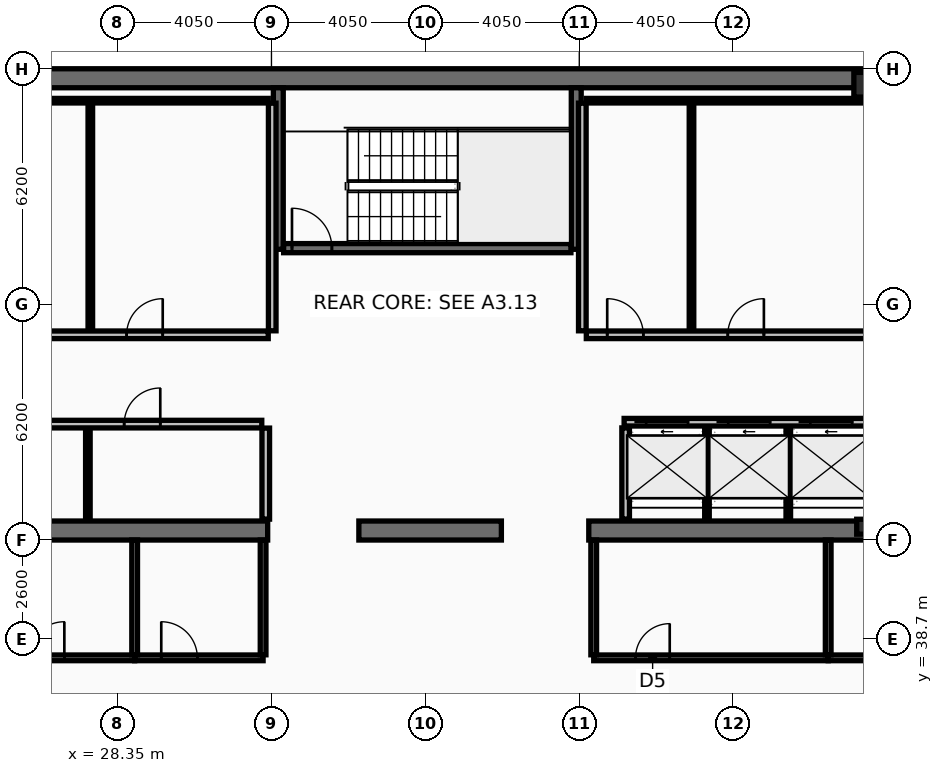
"""IFC4 building model, lengths in metres.
Left out: names, types, materials, properties, quantities, classifications, styles, units other than length and angle.
Written with IfcOpenShell. Run it as: python <this file> out.ifc"""

import sys

from ifc_helpers import new_model, si_unit, direction, frame, frame_2d, origin, origin_2d, place, context, subcontext, project, spatial, rectangle, hollow_rectangle, i_section, extrude, element, fill, save


model = new_model("IFC4")
c1 = context("Model", 3, precision=1e-05, world=origin(), true_north=direction((0.0, 1.0)))
c2 = subcontext(c1, "Body", "Model", "MODEL_VIEW")
j1 = project(units=[si_unit("LENGTHUNIT", "METRE"), si_unit("PLANEANGLEUNIT", "RADIAN")], contexts=[c1])
p1 = place(None, origin())
s1 = spatial("IfcSite", under=j1, at=p1, CompositionType="ELEMENT")
p2 = place(p1, origin())
s2 = spatial("IfcBuilding", under=s1, at=p2, CompositionType="ELEMENT")
p3 = place(p2, frame((0.0, 0.0, 325.4)))
s3 = spatial("IfcBuildingStorey", under=s2, at=p3, CompositionType="ELEMENT", Elevation=325.4)
p4 = place(p3, frame((16.2, 53.45, 0.0), z_axis=(0.0, 0.0, 1.0), x_axis=(1.0, 0.0, 0.0)))
e1 = element("IfcWall", 1, at=p4, inside=s3, PredefinedType="SHEAR", context=c2, shape_type="SweptSolid", body=[
    extrude(rectangle(XDim=40.5, YDim=0.5, at=frame_2d((20.25, 0.0))), origin(), (0.0, 0.0, 1.0), 3.44),
])
p5 = place(p3, frame((32.3, 41.55, 0.0), z_axis=(0.0, 0.0, 1.0), x_axis=(-1.0, 0.0, 0.0)))
e2 = element("IfcWall", 2, at=p5, inside=s3, PredefinedType="SHEAR", context=c2, shape_type="SweptSolid", body=[
    extrude(rectangle(XDim=11.45, YDim=0.5, at=frame_2d((5.725, 0.0))), origin(), (0.0, 0.0, 1.0), 3.44),
])
p6 = place(p3, frame((38.45, 41.55, 0.0), z_axis=(0.0, 0.0, 1.0), x_axis=(-1.0, 0.0, 0.0)))
e3 = element("IfcWall", 3, at=p6, inside=s3, PredefinedType="SHEAR", context=c2, shape_type="SweptSolid", body=[
    extrude(rectangle(XDim=3.75, YDim=0.5, at=frame_2d((1.875, 0.0))), origin(), (0.0, 0.0, 1.0), 3.44),
])
p7 = place(p3, frame((52.05, 41.55, 0.0), z_axis=(0.0, 0.0, 1.0), x_axis=(-1.0, 0.0, 0.0)))
e4 = element("IfcWall", 4, at=p7, inside=s3, PredefinedType="SHEAR", context=c2, shape_type="SweptSolid", body=[
    extrude(rectangle(XDim=11.3, YDim=0.5, at=frame_2d((5.65, 0.0))), origin(), (0.0, 0.0, 1.0), 3.44),
])
for number, where, z_axis, x_axis in (
    (5, (32.58, 48.95, 0.0), (0.0, 0.0, 1.0), (0.0, 1.0, 0.0)),
    (6, (40.42, 48.95, 0.0), (0.0, 0.0, 1.0), (0.0, 1.0, 0.0)),
):
    element("IfcWall", number, at=place(p3, frame(where, z_axis=z_axis, x_axis=x_axis)), inside=s3, PredefinedType="SHEAR", context=c2, shape_type="SweptSolid", body=[
        extrude(rectangle(XDim=4.25, YDim=0.26, at=frame_2d((2.125, 0.0))), origin(), (0.0, 0.0, 1.0), 3.44),
    ])
p8 = place(p3, frame((32.72, 48.98, 0.0), z_axis=(0.0, 0.0, 1.0), x_axis=(1.0, 0.0, 0.0)))
e7 = element("IfcWall", 7, at=p8, inside=s3, PredefinedType="SHEAR", context=c2, shape_type="SweptSolid", body=[
    extrude(rectangle(XDim=7.56, YDim=0.24, at=frame_2d((3.78, 0.0))), origin(), (0.0, 0.0, 1.0), 3.44),
])
p9 = place(p8, frame((0.22, 0.0, 0.0)))
e8 = element("IfcOpeningElement", 8, at=p9, cuts=e7, PredefinedType="OPENING", context=c2, shape_type="SweptSolid", body=[
    extrude(rectangle(XDim=1.05, YDim=2.15, at=frame_2d((0.525, 1.075))), frame((0.0, 0.13, 0.0), z_axis=(0.0, -1.0, 0.0), x_axis=(1.0, 0.0, 0.0)), (0.0, 0.0, 1.0), 0.26),
])
p10 = place(p3, frame((48.0, 53.28, 0.0), z_axis=(0.0, 0.0, 1.0), x_axis=(1.0, 0.0, 0.0)))
e9 = element("IfcColumn", 9, at=p10, inside=s3, PredefinedType="COLUMN", context=c2, shape_type="SweptSolid", body=[
    extrude(hollow_rectangle(XDim=0.55, YDim=0.65, WallThickness=0.04, at=origin_2d()), origin(), (0.0, 0.0, 1.0), 3.6),
])
p11 = place(p3, frame((48.0, 41.65, 0.0), z_axis=(0.0, 0.0, 1.0), x_axis=(1.0, 0.0, 0.0)))
e10 = element("IfcColumn", 10, at=p11, inside=s3, PredefinedType="COLUMN", context=c2, shape_type="SweptSolid", body=[
    extrude(i_section(OverallWidth=0.399, OverallDepth=0.393, WebThickness=0.023, FlangeThickness=0.037, at=origin_2d()), origin(), (0.0, 0.0, 1.0), 3.6),
])
p12 = place(p3, frame((41.68, 44.4, 0.0), z_axis=(0.0, 0.0, 1.0), x_axis=(1.0, 0.0, 0.0)))
e11 = element("IfcWall", 11, at=p12, inside=s3, PredefinedType="PARTITIONING", context=c2, shape_type="SweptSolid", body=[
    extrude(rectangle(XDim=6.48, YDim=0.2, at=frame_2d((3.24, 0.0))), origin(), (0.0, 0.0, 1.0), 3.44),
])
p13 = place(p12, frame((0.58, 0.0, 0.0)))
e12 = element("IfcOpeningElement", 12, at=p13, cuts=e11, PredefinedType="OPENING", context=c2, shape_type="SweptSolid", body=[
    extrude(rectangle(XDim=1.1, YDim=2.18, at=frame_2d((0.55, 1.09))), frame((0.0, 0.11, 0.0), z_axis=(0.0, -1.0, 0.0), x_axis=(1.0, 0.0, 0.0)), (0.0, 0.0, 1.0), 0.22),
])
p14 = place(p12, frame((2.74, 0.0, 0.0)))
e13 = element("IfcOpeningElement", 13, at=p14, cuts=e11, PredefinedType="OPENING", context=c2, shape_type="SweptSolid", body=[
    extrude(rectangle(XDim=1.1, YDim=2.18, at=frame_2d((0.55, 1.09))), frame((0.0, 0.11, 0.0), z_axis=(0.0, -1.0, 0.0), x_axis=(1.0, 0.0, 0.0)), (0.0, 0.0, 1.0), 0.22),
])
p15 = place(p12, frame((4.9, 0.0, 0.0)))
e14 = element("IfcOpeningElement", 14, at=p15, cuts=e11, PredefinedType="OPENING", context=c2, shape_type="SweptSolid", body=[
    extrude(rectangle(XDim=1.1, YDim=2.18, at=frame_2d((0.55, 1.09))), frame((0.0, 0.11, 0.0), z_axis=(0.0, -1.0, 0.0), x_axis=(1.0, 0.0, 0.0)), (0.0, 0.0, 1.0), 0.22),
])
p16 = place(p3, frame((32.42, 46.805, 0.0), z_axis=(0.0, 0.0, 1.0), x_axis=(0.0, 1.0, 0.0)))
e15 = element("IfcWall", 15, at=p16, inside=s3, PredefinedType="PARTITIONING", context=c2, shape_type="SweptSolid", body=[
    extrude(rectangle(XDim=5.99, YDim=0.2, at=frame_2d((2.995, 0.0))), origin(), (0.0, 0.0, 1.0), 3.44),
])
p17 = place(p3, frame((24.805, 52.86, 0.0), z_axis=(0.0, 0.0, 1.0), x_axis=(1.0, 0.0, 0.0)))
e16 = element("IfcWall", 16, at=p17, inside=s3, PredefinedType="PARTITIONING", context=c2, shape_type="SweptSolid", body=[
    extrude(rectangle(XDim=7.51, YDim=0.12, at=frame_2d((3.755, 0.0))), origin(), (0.0, 0.0, 1.0), 3.44),
])
p18 = place(p3, frame((27.634, 46.805, 0.0), z_axis=(0.0, 0.0, 1.0), x_axis=(0.0, 1.0, 0.0)))
e17 = element("IfcWall", 17, at=p18, inside=s3, PredefinedType="PARTITIONING", context=c2, shape_type="SweptSolid", body=[
    extrude(rectangle(XDim=5.99, YDim=0.12, at=frame_2d((2.995, 0.0))), origin(), (0.0, 0.0, 1.0), 3.44),
])
p19 = place(p3, frame((24.805, 46.7, 0.0), z_axis=(0.0, 0.0, 1.0), x_axis=(1.0, 0.0, 0.0)))
e18 = element("IfcWall", 18, at=p19, inside=s3, PredefinedType="PARTITIONING", context=c2, shape_type="SweptSolid", body=[
    extrude(rectangle(XDim=7.51, YDim=0.2, at=frame_2d((3.755, 0.0))), origin(), (0.0, 0.0, 1.0), 3.44),
])
p20 = place(p19, frame((0.55, 0.0, 0.0)))
e19 = element("IfcOpeningElement", 19, at=p20, cuts=e18, PredefinedType="OPENING", context=c2, shape_type="SweptSolid", body=[
    extrude(rectangle(XDim=0.95, YDim=2.1, at=frame_2d((0.475, 1.05))), frame((0.0, 0.11, 0.0), z_axis=(0.0, -1.0, 0.0), x_axis=(1.0, 0.0, 0.0)), (0.0, 0.0, 1.0), 0.22),
])
p21 = place(p19, frame((3.784, 0.0, 0.0)))
e20 = element("IfcOpeningElement", 20, at=p21, cuts=e18, PredefinedType="OPENING", context=c2, shape_type="SweptSolid", body=[
    extrude(rectangle(XDim=0.95, YDim=2.1, at=frame_2d((0.475, 1.05))), frame((0.0, 0.11, 0.0), z_axis=(0.0, -1.0, 0.0), x_axis=(1.0, 0.0, 0.0)), (0.0, 0.0, 1.0), 0.22),
])
p22 = place(p3, frame((32.25, 41.85, 0.0), z_axis=(0.0, 0.0, 1.0), x_axis=(0.0, 1.0, 0.0)))
e21 = element("IfcWall", 21, at=p22, inside=s3, PredefinedType="PARTITIONING", context=c2, shape_type="SweptSolid", body=[
    extrude(rectangle(XDim=2.395, YDim=0.2, at=frame_2d((1.198, 0.0))), origin(), (0.0, 0.0, 1.0), 3.44),
])
p23 = place(p3, frame((27.569, 41.85, 0.0), z_axis=(0.0, 0.0, 1.0), x_axis=(0.0, 1.0, 0.0)))
e22 = element("IfcWall", 22, at=p23, inside=s3, PredefinedType="PARTITIONING", context=c2, shape_type="SweptSolid", body=[
    extrude(rectangle(XDim=2.395, YDim=0.12, at=frame_2d((1.198, 0.0))), origin(), (0.0, 0.0, 1.0), 3.44),
])
p24 = place(p3, frame((24.805, 44.35, 0.0), z_axis=(0.0, 0.0, 1.0), x_axis=(1.0, 0.0, 0.0)))
e23 = element("IfcWall", 23, at=p24, inside=s3, PredefinedType="PARTITIONING", context=c2, shape_type="SweptSolid", body=[
    extrude(rectangle(XDim=7.34, YDim=0.2, at=frame_2d((3.67, 0.0))), origin(), (0.0, 0.0, 1.0), 3.44),
])
p25 = place(p24, frame((0.55, 0.0, 0.0)))
e24 = element("IfcOpeningElement", 24, at=p25, cuts=e23, PredefinedType="OPENING", context=c2, shape_type="SweptSolid", body=[
    extrude(rectangle(XDim=0.95, YDim=2.1, at=frame_2d((0.475, 1.05))), frame((0.0, 0.11, 0.0), z_axis=(0.0, -1.0, 0.0), x_axis=(1.0, 0.0, 0.0)), (0.0, 0.0, 1.0), 0.22),
])
p26 = place(p24, frame((3.719, 0.0, 0.0)))
e25 = element("IfcOpeningElement", 25, at=p26, cuts=e23, PredefinedType="OPENING", context=c2, shape_type="SweptSolid", body=[
    extrude(rectangle(XDim=0.95, YDim=2.1, at=frame_2d((0.475, 1.05))), frame((0.0, 0.11, 0.0), z_axis=(0.0, -1.0, 0.0), x_axis=(1.0, 0.0, 0.0)), (0.0, 0.0, 1.0), 0.22),
])
p27 = place(p3, frame((40.58, 46.805, 0.0), z_axis=(0.0, 0.0, 1.0), x_axis=(0.0, 1.0, 0.0)))
e26 = element("IfcWall", 26, at=p27, inside=s3, PredefinedType="PARTITIONING", context=c2, shape_type="SweptSolid", body=[
    extrude(rectangle(XDim=5.99, YDim=0.2, at=frame_2d((2.995, 0.0))), origin(), (0.0, 0.0, 1.0), 3.44),
])
p28 = place(p3, frame((40.685, 52.86, 0.0), z_axis=(0.0, 0.0, 1.0), x_axis=(1.0, 0.0, 0.0)))
e27 = element("IfcWall", 27, at=p28, inside=s3, PredefinedType="PARTITIONING", context=c2, shape_type="SweptSolid", body=[
    extrude(rectangle(XDim=7.35, YDim=0.12, at=frame_2d((3.675, 0.0))), origin(), (0.0, 0.0, 1.0), 3.44),
])
p29 = place(p3, frame((43.453, 46.805, 0.0), z_axis=(0.0, 0.0, 1.0), x_axis=(0.0, 1.0, 0.0)))
e28 = element("IfcWall", 28, at=p29, inside=s3, PredefinedType="PARTITIONING", context=c2, shape_type="SweptSolid", body=[
    extrude(rectangle(XDim=5.99, YDim=0.12, at=frame_2d((2.995, 0.0))), origin(), (0.0, 0.0, 1.0), 3.44),
])
p30 = place(p3, frame((40.685, 46.7, 0.0), z_axis=(0.0, 0.0, 1.0), x_axis=(1.0, 0.0, 0.0)))
e29 = element("IfcWall", 29, at=p30, inside=s3, PredefinedType="PARTITIONING", context=c2, shape_type="SweptSolid", body=[
    extrude(rectangle(XDim=7.35, YDim=0.2, at=frame_2d((3.675, 0.0))), origin(), (0.0, 0.0, 1.0), 3.44),
])
p31 = place(p30, frame((0.55, 0.0, 0.0)))
e30 = element("IfcOpeningElement", 30, at=p31, cuts=e29, PredefinedType="OPENING", context=c2, shape_type="SweptSolid", body=[
    extrude(rectangle(XDim=0.95, YDim=2.1, at=frame_2d((0.475, 1.05))), frame((0.0, 0.11, 0.0), z_axis=(0.0, -1.0, 0.0), x_axis=(1.0, 0.0, 0.0)), (0.0, 0.0, 1.0), 0.22),
])
p32 = place(p30, frame((3.723, 0.0, 0.0)))
e31 = element("IfcOpeningElement", 31, at=p32, cuts=e29, PredefinedType="OPENING", context=c2, shape_type="SweptSolid", body=[
    extrude(rectangle(XDim=0.95, YDim=2.1, at=frame_2d((0.475, 1.05))), frame((0.0, 0.11, 0.0), z_axis=(0.0, -1.0, 0.0), x_axis=(1.0, 0.0, 0.0)), (0.0, 0.0, 1.0), 0.22),
])
p33 = place(p3, frame((41.72, 41.85, 0.0), z_axis=(0.0, 0.0, 1.0), x_axis=(0.0, 1.0, 0.0)))
e32 = element("IfcWall", 32, at=p33, inside=s3, PredefinedType="PARTITIONING", context=c2, shape_type="SweptSolid", body=[
    extrude(rectangle(XDim=2.4, YDim=0.2, at=frame_2d((1.2, 0.0))), origin(), (0.0, 0.0, 1.0), 3.44),
])
for number, where, z_axis, x_axis in (
    (33, (43.86, 41.85, 0.0), (0.0, 0.0, 1.0), (0.0, 1.0, 0.0)),
    (34, (46.0, 41.85, 0.0), (0.0, 0.0, 1.0), (0.0, 1.0, 0.0)),
):
    element("IfcWall", number, at=place(p3, frame(where, z_axis=z_axis, x_axis=x_axis)), inside=s3, PredefinedType="PARTITIONING", context=c2, shape_type="SweptSolid", body=[
        extrude(rectangle(XDim=2.4, YDim=0.12, at=frame_2d((1.2, 0.0))), origin(), (0.0, 0.0, 1.0), 3.44),
    ])
p34 = place(p3, frame((25.1, 38.2, 0.0), z_axis=(0.0, 0.0, 1.0), x_axis=(1.0, 0.0, 0.0)))
e35 = element("IfcWall", 35, at=p34, inside=s3, PredefinedType="PARTITIONING", context=c2, shape_type="SweptSolid", body=[
    extrude(rectangle(XDim=3.7, YDim=0.15, at=frame_2d((1.85, 0.0))), origin(), (0.0, 0.0, 1.0), 2.83),
])
p35 = place(p34, frame((0.9, 0.0, 0.0)))
e36 = element("IfcOpeningElement", 36, at=p35, cuts=e35, PredefinedType="OPENING", context=c2, shape_type="SweptSolid", body=[
    extrude(rectangle(XDim=0.95, YDim=2.05, at=frame_2d((0.475, 1.025))), frame((0.0, 0.085, 0.0), z_axis=(0.0, -1.0, 0.0), x_axis=(1.0, 0.0, 0.0)), (0.0, 0.0, 1.0), 0.17),
])
p36 = place(p3, frame((28.8, 38.2, 0.0), z_axis=(0.0, 0.0, 1.0), x_axis=(1.0, 0.0, 0.0)))
e37 = element("IfcWall", 37, at=p36, inside=s3, PredefinedType="PARTITIONING", context=c2, shape_type="SweptSolid", body=[
    extrude(rectangle(XDim=3.38, YDim=0.15, at=frame_2d((1.69, 0.0))), origin(), (0.0, 0.0, 1.0), 3.44),
])
p37 = place(p36, frame((0.7, 0.0, 0.0)))
e38 = element("IfcOpeningElement", 38, at=p37, cuts=e37, PredefinedType="OPENING", context=c2, shape_type="SweptSolid", body=[
    extrude(rectangle(XDim=0.95, YDim=2.05, at=frame_2d((0.475, 1.025))), frame((0.0, 0.085, 0.0), z_axis=(0.0, -1.0, 0.0), x_axis=(1.0, 0.0, 0.0)), (0.0, 0.0, 1.0), 0.17),
])
for number, where, z_axis, x_axis in (
    (39, (28.8, 38.28, 0.0), (0.0, 0.0, 1.0), (0.0, 1.0, 0.0)),
    (40, (32.18, 38.28, 0.0), (0.0, 0.0, 1.0), (0.0, 1.0, 0.0)),
):
    element("IfcWall", number, at=place(p3, frame(where, z_axis=z_axis, x_axis=x_axis)), inside=s3, PredefinedType="PARTITIONING", context=c2, shape_type="SweptSolid", body=[
        extrude(rectangle(XDim=3.02, YDim=0.15, at=frame_2d((1.51, 0.0))), origin(), (0.0, 0.0, 1.0), 3.44),
    ])
p38 = place(p3, frame((40.88, 38.2, 0.0), z_axis=(0.0, 0.0, 1.0), x_axis=(1.0, 0.0, 0.0)))
e41 = element("IfcWall", 41, at=p38, inside=s3, PredefinedType="PARTITIONING", context=c2, shape_type="SweptSolid", body=[
    extrude(rectangle(XDim=6.17, YDim=0.15, at=frame_2d((3.085, 0.0))), origin(), (0.0, 0.0, 1.0), 3.44),
])
p39 = place(p38, frame((1.1, 0.0, 0.0)))
e42 = element("IfcOpeningElement", 42, at=p39, cuts=e41, PredefinedType="OPENING", context=c2, shape_type="SweptSolid", body=[
    extrude(rectangle(XDim=0.9, YDim=2.05, at=frame_2d((0.45, 1.025))), frame((0.0, 0.085, 0.0), z_axis=(0.0, -1.0, 0.0), x_axis=(1.0, 0.0, 0.0)), (0.0, 0.0, 1.0), 0.17),
])
p40 = place(p3, frame((47.05, 38.2, 0.0), z_axis=(0.0, 0.0, 1.0), x_axis=(1.0, 0.0, 0.0)))
e43 = element("IfcWall", 43, at=p40, inside=s3, PredefinedType="PARTITIONING", context=c2, shape_type="SweptSolid", body=[
    extrude(rectangle(XDim=4.9, YDim=0.15, at=frame_2d((2.45, 0.0))), origin(), (0.0, 0.0, 1.0), 2.83),
])
p41 = place(p40, frame((1.1, 0.0, 0.0)))
e44 = element("IfcOpeningElement", 44, at=p41, cuts=e43, PredefinedType="OPENING", context=c2, shape_type="SweptSolid", body=[
    extrude(rectangle(XDim=1.0, YDim=2.05, at=frame_2d((0.5, 1.025))), frame((0.0, 0.085, 0.0), z_axis=(0.0, -1.0, 0.0), x_axis=(1.0, 0.0, 0.0)), (0.0, 0.0, 1.0), 0.17),
])
for number, where, z_axis, x_axis in (
    (45, (40.88, 38.28, 0.0), (0.0, 0.0, 1.0), (0.0, 1.0, 0.0)),
    (46, (47.05, 38.28, 0.0), (0.0, 0.0, 1.0), (0.0, 1.0, 0.0)),
):
    element("IfcWall", number, at=place(p3, frame(where, z_axis=z_axis, x_axis=x_axis)), inside=s3, PredefinedType="PARTITIONING", context=c2, shape_type="SweptSolid", body=[
        extrude(rectangle(XDim=3.02, YDim=0.15, at=frame_2d((1.51, 0.0))), origin(), (0.0, 0.0, 1.0), 3.44),
    ])
p42 = place(p9, origin())
e47 = element("IfcDoor", 47, at=p42, inside=s3, OperationType="SINGLE_SWING_LEFT", PredefinedType="DOOR", context=c2, shape_type="SweptSolid", body=[
    extrude(rectangle(XDim=1.05, YDim=2.15, at=frame_2d((0.525, 1.075))), frame((0.0, 0.025, 0.0), z_axis=(0.0, -1.0, 0.0), x_axis=(1.0, 0.0, 0.0)), (0.0, 0.0, 1.0), 0.05),
])
fill(e8, e47)
p43 = place(p13, origin())
e48 = element("IfcDoor", 48, at=p43, inside=s3, OperationType="SLIDING_TO_LEFT", PredefinedType="DOOR", context=c2, shape_type="SweptSolid", body=[
    extrude(rectangle(XDim=1.1, YDim=2.18, at=frame_2d((0.55, 1.09))), frame((0.0, 0.025, 0.0), z_axis=(0.0, -1.0, 0.0), x_axis=(1.0, 0.0, 0.0)), (0.0, 0.0, 1.0), 0.05),
])
fill(e12, e48)
p44 = place(p14, origin())
e49 = element("IfcDoor", 49, at=p44, inside=s3, OperationType="SLIDING_TO_LEFT", PredefinedType="DOOR", context=c2, shape_type="SweptSolid", body=[
    extrude(rectangle(XDim=1.1, YDim=2.18, at=frame_2d((0.55, 1.09))), frame((0.0, 0.025, 0.0), z_axis=(0.0, -1.0, 0.0), x_axis=(1.0, 0.0, 0.0)), (0.0, 0.0, 1.0), 0.05),
])
fill(e13, e49)
p45 = place(p15, origin())
e50 = element("IfcDoor", 50, at=p45, inside=s3, OperationType="SLIDING_TO_LEFT", PredefinedType="DOOR", context=c2, shape_type="SweptSolid", body=[
    extrude(rectangle(XDim=1.1, YDim=2.18, at=frame_2d((0.55, 1.09))), frame((0.0, 0.025, 0.0), z_axis=(0.0, -1.0, 0.0), x_axis=(1.0, 0.0, 0.0)), (0.0, 0.0, 1.0), 0.05),
])
fill(e14, e50)
p46 = place(p21, origin())
e51 = element("IfcDoor", 51, at=p46, inside=s3, OperationType="SINGLE_SWING_RIGHT", PredefinedType="DOOR", context=c2, shape_type="SweptSolid", body=[
    extrude(rectangle(XDim=0.95, YDim=2.1, at=frame_2d((0.475, 1.05))), frame((0.0, 0.025, 0.0), z_axis=(0.0, -1.0, 0.0), x_axis=(1.0, 0.0, 0.0)), (0.0, 0.0, 1.0), 0.05),
])
fill(e20, e51)
p47 = place(p26, origin())
e52 = element("IfcDoor", 52, at=p47, inside=s3, OperationType="SINGLE_SWING_RIGHT", PredefinedType="DOOR", context=c2, shape_type="SweptSolid", body=[
    extrude(rectangle(XDim=0.95, YDim=2.1, at=frame_2d((0.475, 1.05))), frame((0.0, 0.025, 0.0), z_axis=(0.0, -1.0, 0.0), x_axis=(1.0, 0.0, 0.0)), (0.0, 0.0, 1.0), 0.05),
])
fill(e25, e52)
p48 = place(p31, origin())
e53 = element("IfcDoor", 53, at=p48, inside=s3, OperationType="SINGLE_SWING_LEFT", PredefinedType="DOOR", context=c2, shape_type="SweptSolid", body=[
    extrude(rectangle(XDim=0.95, YDim=2.1, at=frame_2d((0.475, 1.05))), frame((0.0, 0.025, 0.0), z_axis=(0.0, -1.0, 0.0), x_axis=(1.0, 0.0, 0.0)), (0.0, 0.0, 1.0), 0.05),
])
fill(e30, e53)
p49 = place(p32, origin())
e54 = element("IfcDoor", 54, at=p49, inside=s3, OperationType="SINGLE_SWING_RIGHT", PredefinedType="DOOR", context=c2, shape_type="SweptSolid", body=[
    extrude(rectangle(XDim=0.95, YDim=2.1, at=frame_2d((0.475, 1.05))), frame((0.0, 0.025, 0.0), z_axis=(0.0, -1.0, 0.0), x_axis=(1.0, 0.0, 0.0)), (0.0, 0.0, 1.0), 0.05),
])
fill(e31, e54)
p50 = place(p35, origin())
e55 = element("IfcDoor", 55, at=p50, inside=s3, OperationType="SINGLE_SWING_RIGHT", PredefinedType="DOOR", context=c2, shape_type="SweptSolid", body=[
    extrude(rectangle(XDim=0.95, YDim=2.05, at=frame_2d((0.475, 1.025))), frame((0.0, 0.025, 0.0), z_axis=(0.0, -1.0, 0.0), x_axis=(1.0, 0.0, 0.0)), (0.0, 0.0, 1.0), 0.05),
])
fill(e36, e55)
p51 = place(p37, origin())
e56 = element("IfcDoor", 56, at=p51, inside=s3, OperationType="SINGLE_SWING_LEFT", PredefinedType="DOOR", context=c2, shape_type="SweptSolid", body=[
    extrude(rectangle(XDim=0.95, YDim=2.05, at=frame_2d((0.475, 1.025))), frame((0.0, 0.025, 0.0), z_axis=(0.0, -1.0, 0.0), x_axis=(1.0, 0.0, 0.0)), (0.0, 0.0, 1.0), 0.05),
])
fill(e38, e56)
p52 = place(p39, origin())
e57 = element("IfcDoor", 57, at=p52, inside=s3, OperationType="SINGLE_SWING_RIGHT", PredefinedType="DOOR", context=c2, shape_type="SweptSolid", body=[
    extrude(rectangle(XDim=0.9, YDim=2.05, at=frame_2d((0.45, 1.025))), frame((0.0, 0.025, 0.0), z_axis=(0.0, -1.0, 0.0), x_axis=(1.0, 0.0, 0.0)), (0.0, 0.0, 1.0), 0.05),
])
fill(e42, e57)
save(model, sys.argv[1])
